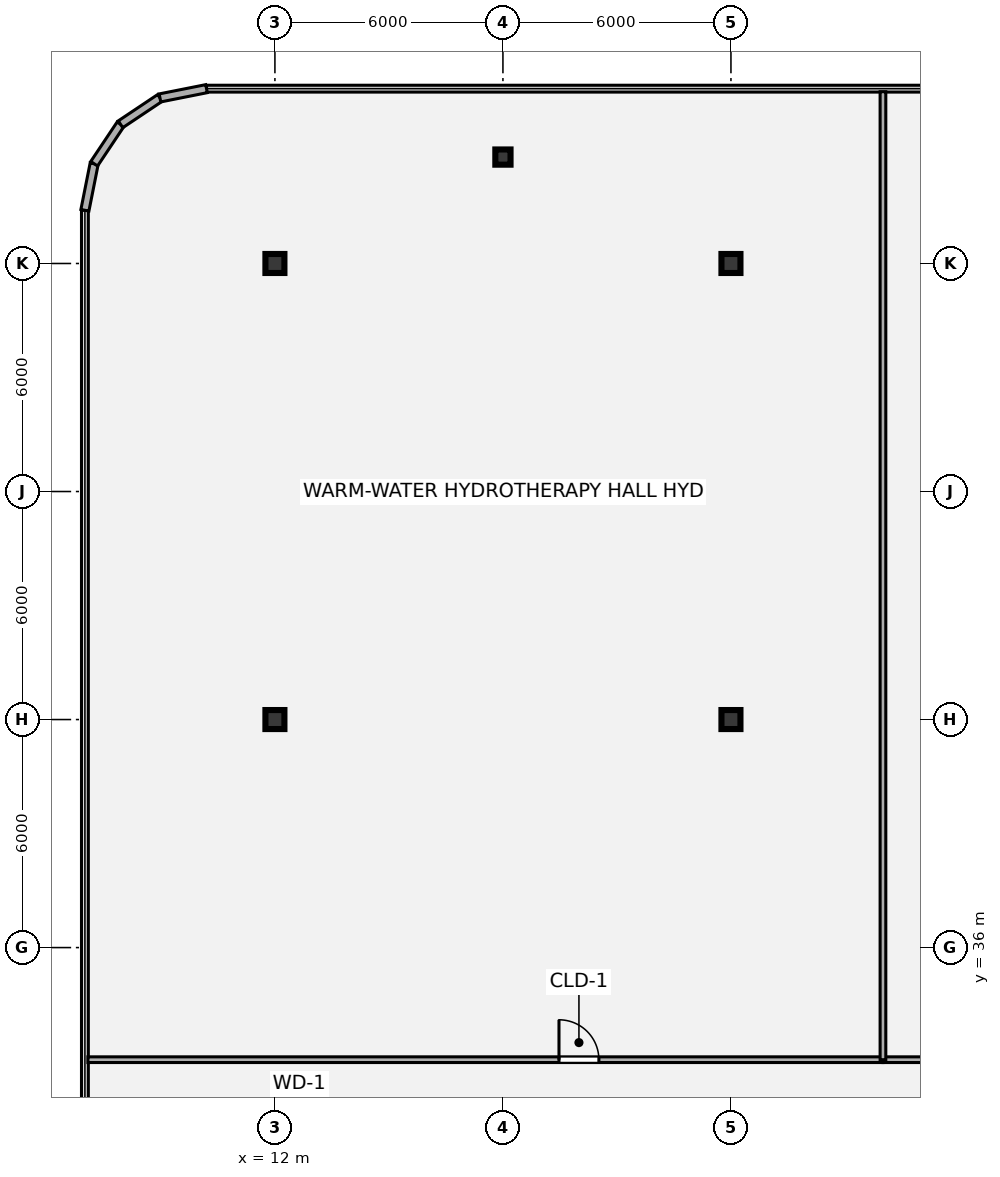
"""IFC4 building model, lengths in metres.
Left out: names, types, materials, properties, quantities, classifications, styles, units other than length and angle.
Written with IfcOpenShell. Run it as: python <this file> out.ifc"""

import sys

from ifc_helpers import new_model, si_unit, direction, frame, frame_2d, origin, origin_2d, place, context, subcontext, project, spatial, rectangle, i_section, extrude, source, transform, mapped, element, fill, save


model = new_model("IFC4")
c1 = context("Model", 3, precision=1e-05, world=origin(), true_north=direction((0.0, 1.0)))
c2 = subcontext(c1, "Body", "Model", "MODEL_VIEW")
j1 = project(units=[si_unit("LENGTHUNIT", "METRE"), si_unit("PLANEANGLEUNIT", "RADIAN")], contexts=[c1])
p1 = place(None, origin())
s1 = spatial("IfcSite", under=j1, at=p1, CompositionType="ELEMENT")
p2 = place(p1, origin())
s2 = spatial("IfcBuilding", under=s1, at=p2, CompositionType="ELEMENT")
p3 = place(p2, frame((0.0, 0.0, 18.36)))
s3 = spatial("IfcBuildingStorey", under=s2, at=p3, CompositionType="ELEMENT", Elevation=18.36)
m1 = source(origin(), c2, "Body", "SweptSolid", [
    extrude(i_section(OverallWidth=0.5, OverallDepth=0.5, WebThickness=0.022, FlangeThickness=0.035, at=origin_2d()), origin(), (0.0, 0.0, 1.0), 4.32),
])
for number, where, z_axis, x_axis in (
    (1, (12.0, 42.0, 0.0), (0.0, 0.0, 1.0), (1.0, 0.0, 0.0)),
    (2, (24.0, 42.0, 0.0), (0.0, 0.0, 1.0), (1.0, 0.0, 0.0)),
    (3, (12.0, 54.0, 0.0), (0.0, 0.0, 1.0), (1.0, 0.0, 0.0)),
    (4, (24.0, 54.0, 0.0), (0.0, 0.0, 1.0), (1.0, 0.0, 0.0)),
):
    element("IfcColumn", number, at=place(p3, frame(where, z_axis=z_axis, x_axis=x_axis)), inside=s3, PredefinedType="COLUMN", context=c2, shape_type="MappedRepresentation", body=[
        mapped(m1, transform((0.0, 0.0, 0.0), x_axis=(1.0, 0.0, 0.0), y_axis=(0.0, 1.0, 0.0), z_axis=(0.0, 0.0, 1.0), scale=1.0)),
    ])
m2 = source(origin(), c2, "Body", "SweptSolid", [
    extrude(i_section(OverallWidth=0.4, OverallDepth=0.4, WebThickness=0.022, FlangeThickness=0.035, at=origin_2d()), origin(), (0.0, 0.0, 1.0), 4.32),
])
p4 = place(p3, frame((18.0, 56.8, 0.0), z_axis=(0.0, 0.0, 1.0), x_axis=(1.0, 0.0, 0.0)))
e5 = element("IfcColumn", 5, at=p4, inside=s3, PredefinedType="COLUMN", context=c2, shape_type="MappedRepresentation", body=[
    mapped(m2, transform((0.0, 0.0, 0.0), x_axis=(1.0, 0.0, 0.0), y_axis=(0.0, 1.0, 0.0), z_axis=(0.0, 0.0, 1.0), scale=1.0)),
])
for number, where, z_axis, x_axis in (
    (6, (7.0, 55.4, 0.0), (0.0, 0.0, 1.0), (0.195, 0.981, 0.0)),
    (7, (7.244, 56.625, 0.0), (0.0, 0.0, 1.0), (0.556, 0.831, 0.0)),
    (8, (7.937, 57.663, 0.0), (0.0, 0.0, 1.0), (0.831, 0.556, 0.0)),
    (9, (8.975, 58.356, 0.0), (0.0, 0.0, 1.0), (0.981, 0.195, 0.0)),
):
    element("IfcWall", number, at=place(p3, frame(where, z_axis=z_axis, x_axis=x_axis)), inside=s3, PredefinedType="SOLIDWALL", context=c2, shape_type="SweptSolid", body=[
        extrude(rectangle(XDim=1.249, YDim=0.215, at=frame_2d((0.624, 0.0))), origin(), (0.0, 0.0, 1.0), 4.04),
    ])
p5 = place(p3, frame((7.08, 33.05, 0.0), z_axis=(0.0, 0.0, 1.0), x_axis=(1.0, 0.0, 0.0)))
e10 = element("IfcWall", 10, at=p5, inside=s3, PredefinedType="PARTITIONING", context=c2, shape_type="SweptSolid", body=[
    extrude(rectangle(XDim=20.92, YDim=0.15, at=frame_2d((10.46, 0.0))), origin(), (0.0, 0.0, 1.0), 4.01),
])
p6 = place(p5, frame((12.395, 0.0, 0.0)))
e11 = element("IfcOpeningElement", 11, at=p6, cuts=e10, PredefinedType="OPENING", context=c2, shape_type="SweptSolid", body=[
    extrude(rectangle(XDim=1.05, YDim=2.1, at=origin_2d()), frame((0.525, 0.085, 1.05), z_axis=(0.0, -1.0, 0.0), x_axis=(1.0, 0.0, 0.0)), (0.0, 0.0, 1.0), 0.17),
])
p7 = place(p3, frame((28.0, 33.05, 0.0), z_axis=(0.0, 0.0, 1.0), x_axis=(1.0, 0.0, 0.0)))
e12 = element("IfcWall", 12, at=p7, inside=s3, PredefinedType="PARTITIONING", context=c2, shape_type="SweptSolid", body=[
    extrude(rectangle(XDim=18.0, YDim=0.15, at=frame_2d((9.0, 0.0))), origin(), (0.0, 0.0, 1.0), 4.01),
])
p8 = place(p7, frame((8.475, 0.0, 0.0)))
e13 = element("IfcOpeningElement", 13, at=p8, cuts=e12, PredefinedType="OPENING", context=c2, shape_type="SweptSolid", body=[
    extrude(rectangle(XDim=1.05, YDim=2.1, at=origin_2d()), frame((0.525, 0.085, 1.05), z_axis=(0.0, -1.0, 0.0), x_axis=(1.0, 0.0, 0.0)), (0.0, 0.0, 1.0), 0.17),
])
p9 = place(p3, frame((28.0, 33.05, 0.0), z_axis=(0.0, 0.0, 1.0), x_axis=(0.0, 1.0, 0.0)))
e14 = element("IfcWall", 14, at=p9, inside=s3, PredefinedType="PARTITIONING", context=c2, shape_type="SweptSolid", body=[
    extrude(rectangle(XDim=25.47, YDim=0.15, at=frame_2d((12.735, 0.0))), origin(), (0.0, 0.0, 1.0), 3.666),
])
m3 = source(origin(), c2, "Body", "SweptSolid", [
    extrude(rectangle(XDim=1.05, YDim=2.1, at=origin_2d()), frame((0.525, 0.025, 1.05), z_axis=(0.0, -1.0, 0.0), x_axis=(1.0, 0.0, 0.0)), (0.0, 0.0, 1.0), 0.05),
])
p10 = place(p6, origin())
e15 = element("IfcDoor", 15, at=p10, inside=s3, OperationType="SINGLE_SWING_LEFT", PredefinedType="DOOR", context=c2, shape_type="MappedRepresentation", body=[
    mapped(m3, transform((0.0, 0.0, 0.0), x_axis=(1.0, 0.0, 0.0), y_axis=(0.0, 1.0, 0.0), z_axis=(0.0, 0.0, 1.0), scale=1.0)),
])
fill(e11, e15)
save(model, sys.argv[1])
